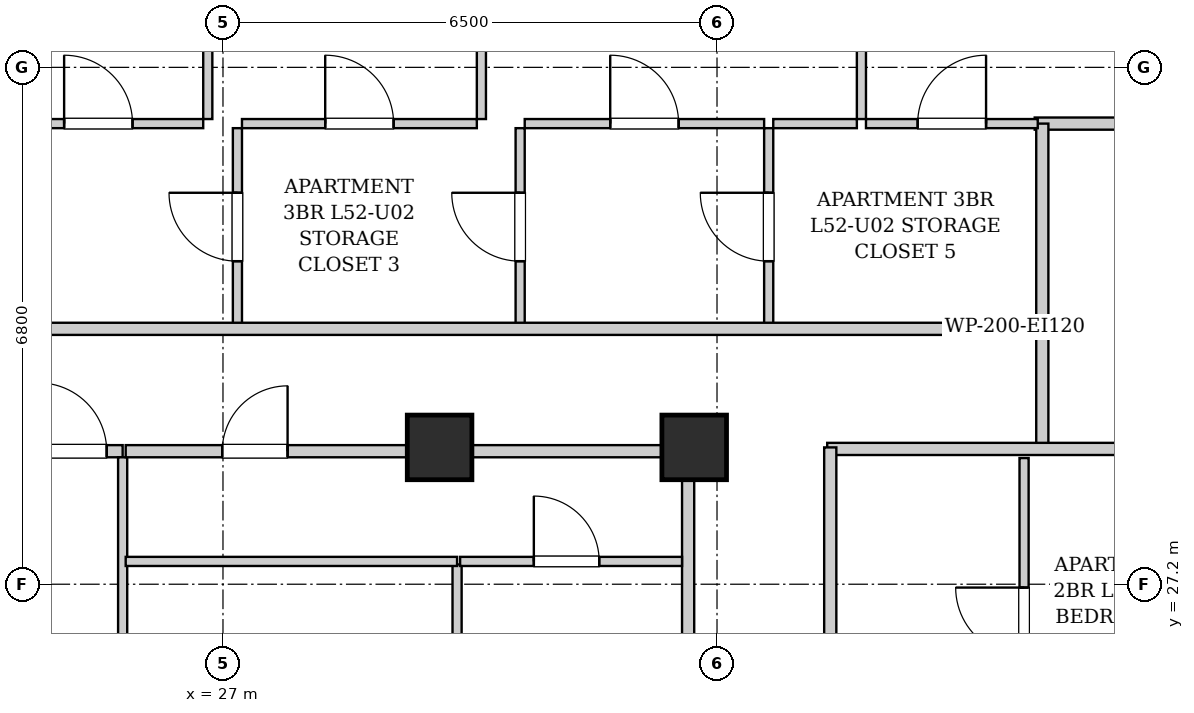
"""IFC4 building model, lengths in metres.
Left out: names, types, materials, properties, quantities, classifications, styles, units other than length and angle.
Written with IfcOpenShell. Run it as: python <this file> out.ifc"""

import sys

from ifc_helpers import new_model, si_unit, direction, frame, frame_2d, origin, origin_2d, place, context, subcontext, project, spatial, rectangle, extrude, element, fill, save


model = new_model("IFC4")
c1 = context("Model", 3, precision=1e-05, world=origin(), true_north=direction((0.0, 1.0)))
c2 = subcontext(c1, "Body", "Model", "MODEL_VIEW")
j1 = project(units=[si_unit("LENGTHUNIT", "METRE"), si_unit("PLANEANGLEUNIT", "RADIAN")], contexts=[c1])
p1 = place(None, origin())
s1 = spatial("IfcSite", under=j1, at=p1, CompositionType="ELEMENT")
p2 = place(p1, origin())
s2 = spatial("IfcBuilding", under=s1, at=p2, CompositionType="ELEMENT")
p3 = place(p2, frame((0.0, 0.0, 181.0)))
s3 = spatial("IfcBuildingStorey", under=s2, at=p3, CompositionType="ELEMENT", Elevation=181.0)
for number, where, z_axis, x_axis in (
    (1, (29.85, 29.0, 0.0), (0.0, 0.0, 1.0), (1.0, 0.0, 0.0)),
    (2, (33.2, 29.0, 0.0), (0.0, 0.0, 1.0), (1.0, 0.0, 0.0)),
):
    element("IfcColumn", number, at=place(p3, frame(where, z_axis=z_axis, x_axis=x_axis)), inside=s3, PredefinedType="COLUMN", context=c2, shape_type="SweptSolid", body=[
        extrude(rectangle(XDim=0.85, YDim=0.85, at=origin_2d()), origin(), (0.0, 0.0, 1.0), 3.3),
    ])
p4 = place(p3, frame((33.12, 24.12, 0.0), z_axis=(0.0, 0.0, 1.0), x_axis=(0.0, 1.0, 0.0)))
e3 = element("IfcWall", 3, at=p4, inside=s3, PredefinedType="PARTITIONING", context=c2, shape_type="SweptSolid", body=[
    extrude(rectangle(XDim=4.76, YDim=0.16, at=frame_2d((2.38, 0.0))), origin(), (0.0, 0.0, 1.0), 3.04),
])
p5 = place(p3, frame((24.36, 28.95, 0.0), z_axis=(0.0, 0.0, 1.0), x_axis=(1.0, 0.0, 0.0)))
e4 = element("IfcWall", 4, at=p5, inside=s3, PredefinedType="PARTITIONING", context=c2, shape_type="SweptSolid", body=[
    extrude(rectangle(XDim=1.32, YDim=0.16, at=frame_2d((0.66, 0.0))), origin(), (0.0, 0.0, 1.0), 2.556),
])
p6 = place(p5, frame((0.21, 0.0, 0.0)))
e5 = element("IfcOpeningElement", 5, at=p6, cuts=e4, PredefinedType="OPENING", context=c2, shape_type="SweptSolid", body=[
    extrude(rectangle(XDim=0.9, YDim=2.05, at=frame_2d((0.45, 1.025))), frame((0.0, 0.09, 0.0), z_axis=(0.0, -1.0, 0.0), x_axis=(1.0, 0.0, 0.0)), (0.0, 0.0, 1.0), 0.18),
])
p7 = place(p3, frame((25.68, 25.0, 0.0), z_axis=(0.0, 0.0, 1.0), x_axis=(0.0, 1.0, 0.0)))
e6 = element("IfcWall", 6, at=p7, inside=s3, PredefinedType="PARTITIONING", context=c2, shape_type="SweptSolid", body=[
    extrude(rectangle(XDim=3.87, YDim=0.12, at=frame_2d((1.935, 0.0))), origin(), (0.0, 0.0, 1.0), 3.04),
])
p8 = place(p3, frame((30.08, 26.18, 0.0), z_axis=(0.0, 0.0, 1.0), x_axis=(0.0, 1.0, 0.0)))
e7 = element("IfcWall", 7, at=p8, inside=s3, PredefinedType="PARTITIONING", context=c2, shape_type="SweptSolid", body=[
    extrude(rectangle(XDim=1.28, YDim=0.12, at=frame_2d((0.64, 0.0))), origin(), (0.0, 0.0, 1.0), 3.04),
])
p9 = place(p3, frame((30.12, 27.5, 0.0), z_axis=(0.0, 0.0, 1.0), x_axis=(1.0, 0.0, 0.0)))
e8 = element("IfcWall", 8, at=p9, inside=s3, PredefinedType="PARTITIONING", context=c2, shape_type="SweptSolid", body=[
    extrude(rectangle(XDim=2.92, YDim=0.12, at=frame_2d((1.46, 0.0))), origin(), (0.0, 0.0, 1.0), 3.04),
])
p10 = place(p9, frame((0.97, 0.0, 0.0)))
e9 = element("IfcOpeningElement", 9, at=p10, cuts=e8, PredefinedType="OPENING", context=c2, shape_type="SweptSolid", body=[
    extrude(rectangle(XDim=0.86, YDim=2.05, at=frame_2d((0.43, 1.025))), frame((0.0, 0.07, 0.0), z_axis=(0.0, -1.0, 0.0), x_axis=(1.0, 0.0, 0.0)), (0.0, 0.0, 1.0), 0.14),
])
p11 = place(p3, frame((25.72, 27.5, 0.0), z_axis=(0.0, 0.0, 1.0), x_axis=(1.0, 0.0, 0.0)))
e10 = element("IfcWall", 10, at=p11, inside=s3, PredefinedType="PARTITIONING", context=c2, shape_type="SweptSolid", body=[
    extrude(rectangle(XDim=4.36, YDim=0.12, at=frame_2d((2.18, 0.0))), origin(), (0.0, 0.0, 1.0), 3.04),
])
p12 = place(p3, frame((25.72, 28.95, 0.0), z_axis=(0.0, 0.0, 1.0), x_axis=(1.0, 0.0, 0.0)))
e11 = element("IfcWall", 11, at=p12, inside=s3, PredefinedType="PARTITIONING", context=c2, shape_type="SweptSolid", body=[
    extrude(rectangle(XDim=7.32, YDim=0.16, at=frame_2d((3.66, 0.0))), origin(), (0.0, 0.0, 1.0), 2.556),
])
p13 = place(p12, frame((1.27, 0.0, 0.0)))
e12 = element("IfcOpeningElement", 12, at=p13, cuts=e11, PredefinedType="OPENING", context=c2, shape_type="SweptSolid", body=[
    extrude(rectangle(XDim=0.86, YDim=2.05, at=frame_2d((0.43, 1.025))), frame((0.0, 0.09, 0.0), z_axis=(0.0, -1.0, 0.0), x_axis=(1.0, 0.0, 0.0)), (0.0, 0.0, 1.0), 0.18),
])
p14 = place(p3, frame((37.78, 28.98, 0.0), z_axis=(0.0, 0.0, 1.0), x_axis=(0.0, 1.0, 0.0)))
e13 = element("IfcWall", 13, at=p14, inside=s3, PredefinedType="PARTITIONING", context=c2, shape_type="SweptSolid", body=[
    extrude(rectangle(XDim=1.58, YDim=0.16, at=frame_2d((0.79, 0.0))), origin(), (0.0, 0.0, 1.0), 3.04),
])
p15 = place(p3, frame((34.95, 28.98, 0.0), z_axis=(0.0, 0.0, 1.0), x_axis=(1.0, 0.0, 0.0)))
e14 = element("IfcWall", 14, at=p15, inside=s3, PredefinedType="PARTITIONING", context=c2, shape_type="SweptSolid", body=[
    extrude(rectangle(XDim=5.07, YDim=0.16, at=frame_2d((2.535, 0.0))), origin(), (0.0, 0.0, 1.0), 2.556),
])
p16 = place(p3, frame((37.68, 33.26, 0.0), z_axis=(0.0, 0.0, 1.0), x_axis=(1.0, 0.0, 0.0)))
e15 = element("IfcWall", 15, at=p16, inside=s3, PredefinedType="PARTITIONING", context=c2, shape_type="SweptSolid", body=[
    extrude(rectangle(XDim=2.34, YDim=0.16, at=frame_2d((1.17, 0.0))), origin(), (0.0, 0.0, 1.0), 3.04),
])
p17 = place(p3, frame((37.78, 30.6, 0.0), z_axis=(0.0, 0.0, 1.0), x_axis=(0.0, 1.0, 0.0)))
e16 = element("IfcWall", 16, at=p17, inside=s3, PredefinedType="PARTITIONING", context=c2, shape_type="SweptSolid", body=[
    extrude(rectangle(XDim=2.66, YDim=0.16, at=frame_2d((1.33, 0.0))), origin(), (0.0, 0.0, 1.0), 3.04),
])
p18 = place(p3, frame((27.19, 30.6, 0.0), z_axis=(0.0, 0.0, 1.0), x_axis=(0.0, 1.0, 0.0)))
e17 = element("IfcWall", 17, at=p18, inside=s3, PredefinedType="PARTITIONING", context=c2, shape_type="SweptSolid", body=[
    extrude(rectangle(XDim=2.6, YDim=0.12, at=frame_2d((1.3, 0.0))), origin(), (0.0, 0.0, 1.0), 3.04),
])
p19 = place(p18, frame((0.85, 0.0, 0.0)))
e18 = element("IfcOpeningElement", 18, at=p19, cuts=e17, PredefinedType="OPENING", context=c2, shape_type="SweptSolid", body=[
    extrude(rectangle(XDim=0.9, YDim=2.05, at=frame_2d((0.45, 1.025))), frame((0.0, 0.07, 0.0), z_axis=(0.0, -1.0, 0.0), x_axis=(1.0, 0.0, 0.0)), (0.0, 0.0, 1.0), 0.14),
])
p20 = place(p3, frame((23.98, 33.26, 0.0), z_axis=(0.0, 0.0, 1.0), x_axis=(1.0, 0.0, 0.0)))
e19 = element("IfcWall", 19, at=p20, inside=s3, PredefinedType="PARTITIONING", context=c2, shape_type="SweptSolid", body=[
    extrude(rectangle(XDim=2.76, YDim=0.12, at=frame_2d((1.38, 0.0))), origin(), (0.0, 0.0, 1.0), 3.04),
])
p21 = place(p20, frame((0.93, 0.0, 0.0)))
e20 = element("IfcOpeningElement", 20, at=p21, cuts=e19, PredefinedType="OPENING", context=c2, shape_type="SweptSolid", body=[
    extrude(rectangle(XDim=0.9, YDim=2.05, at=frame_2d((0.45, 1.025))), frame((0.0, 0.07, 0.0), z_axis=(0.0, -1.0, 0.0), x_axis=(1.0, 0.0, 0.0)), (0.0, 0.0, 1.0), 0.14),
])
p22 = place(p3, frame((30.91, 30.6, 0.0), z_axis=(0.0, 0.0, 1.0), x_axis=(0.0, 1.0, 0.0)))
e21 = element("IfcWall", 21, at=p22, inside=s3, PredefinedType="PARTITIONING", context=c2, shape_type="SweptSolid", body=[
    extrude(rectangle(XDim=2.6, YDim=0.12, at=frame_2d((1.3, 0.0))), origin(), (0.0, 0.0, 1.0), 3.04),
])
p23 = place(p22, frame((0.85, 0.0, 0.0)))
e22 = element("IfcOpeningElement", 22, at=p23, cuts=e21, PredefinedType="OPENING", context=c2, shape_type="SweptSolid", body=[
    extrude(rectangle(XDim=0.9, YDim=2.05, at=frame_2d((0.45, 1.025))), frame((0.0, 0.07, 0.0), z_axis=(0.0, -1.0, 0.0), x_axis=(1.0, 0.0, 0.0)), (0.0, 0.0, 1.0), 0.14),
])
p24 = place(p3, frame((27.25, 33.26, 0.0), z_axis=(0.0, 0.0, 1.0), x_axis=(1.0, 0.0, 0.0)))
e23 = element("IfcWall", 23, at=p24, inside=s3, PredefinedType="PARTITIONING", context=c2, shape_type="SweptSolid", body=[
    extrude(rectangle(XDim=3.09, YDim=0.12, at=frame_2d((1.545, 0.0))), origin(), (0.0, 0.0, 1.0), 3.04),
])
p25 = place(p24, frame((1.095, 0.0, 0.0)))
e24 = element("IfcOpeningElement", 24, at=p25, cuts=e23, PredefinedType="OPENING", context=c2, shape_type="SweptSolid", body=[
    extrude(rectangle(XDim=0.9, YDim=2.05, at=frame_2d((0.45, 1.025))), frame((0.0, 0.07, 0.0), z_axis=(0.0, -1.0, 0.0), x_axis=(1.0, 0.0, 0.0)), (0.0, 0.0, 1.0), 0.14),
])
p26 = place(p3, frame((34.18, 30.6, 0.0), z_axis=(0.0, 0.0, 1.0), x_axis=(0.0, 1.0, 0.0)))
e25 = element("IfcWall", 25, at=p26, inside=s3, PredefinedType="PARTITIONING", context=c2, shape_type="SweptSolid", body=[
    extrude(rectangle(XDim=2.6, YDim=0.12, at=frame_2d((1.3, 0.0))), origin(), (0.0, 0.0, 1.0), 3.04),
])
p27 = place(p26, frame((0.85, 0.0, 0.0)))
e26 = element("IfcOpeningElement", 26, at=p27, cuts=e25, PredefinedType="OPENING", context=c2, shape_type="SweptSolid", body=[
    extrude(rectangle(XDim=0.9, YDim=2.05, at=frame_2d((0.45, 1.025))), frame((0.0, 0.07, 0.0), z_axis=(0.0, -1.0, 0.0), x_axis=(1.0, 0.0, 0.0)), (0.0, 0.0, 1.0), 0.14),
])
p28 = place(p3, frame((30.97, 33.26, 0.0), z_axis=(0.0, 0.0, 1.0), x_axis=(1.0, 0.0, 0.0)))
e27 = element("IfcWall", 27, at=p28, inside=s3, PredefinedType="PARTITIONING", context=c2, shape_type="SweptSolid", body=[
    extrude(rectangle(XDim=3.15, YDim=0.12, at=frame_2d((1.575, 0.0))), origin(), (0.0, 0.0, 1.0), 3.04),
])
p29 = place(p28, frame((1.125, 0.0, 0.0)))
e28 = element("IfcOpeningElement", 28, at=p29, cuts=e27, PredefinedType="OPENING", context=c2, shape_type="SweptSolid", body=[
    extrude(rectangle(XDim=0.9, YDim=2.05, at=frame_2d((0.45, 1.025))), frame((0.0, 0.07, 0.0), z_axis=(0.0, -1.0, 0.0), x_axis=(1.0, 0.0, 0.0)), (0.0, 0.0, 1.0), 0.14),
])
p30 = place(p3, frame((34.24, 33.26, 0.0), z_axis=(0.0, 0.0, 1.0), x_axis=(1.0, 0.0, 0.0)))
e29 = element("IfcWall", 29, at=p30, inside=s3, PredefinedType="PARTITIONING", context=c2, shape_type="SweptSolid", body=[
    extrude(rectangle(XDim=1.1, YDim=0.12, at=frame_2d((0.55, 0.0))), origin(), (0.0, 0.0, 1.0), 3.04),
])
p31 = place(p3, frame((35.46, 33.26, 0.0), z_axis=(0.0, 0.0, 1.0), x_axis=(1.0, 0.0, 0.0)))
e30 = element("IfcWall", 30, at=p31, inside=s3, PredefinedType="PARTITIONING", context=c2, shape_type="SweptSolid", body=[
    extrude(rectangle(XDim=2.26, YDim=0.12, at=frame_2d((1.13, 0.0))), origin(), (0.0, 0.0, 1.0), 3.04),
])
p32 = place(p31, frame((0.68, 0.0, 0.0)))
e31 = element("IfcOpeningElement", 31, at=p32, cuts=e30, PredefinedType="OPENING", context=c2, shape_type="SweptSolid", body=[
    extrude(rectangle(XDim=0.9, YDim=2.05, at=frame_2d((0.45, 1.025))), frame((0.0, 0.07, 0.0), z_axis=(0.0, -1.0, 0.0), x_axis=(1.0, 0.0, 0.0)), (0.0, 0.0, 1.0), 0.14),
])
p33 = place(p3, frame((26.8, 33.32, 0.0), z_axis=(0.0, 0.0, 1.0), x_axis=(0.0, 1.0, 0.0)))
e32 = element("IfcWall", 32, at=p33, inside=s3, PredefinedType="PARTITIONING", context=c2, shape_type="SweptSolid", body=[
    extrude(rectangle(XDim=6.6, YDim=0.12, at=frame_2d((3.3, 0.0))), origin(), (0.0, 0.0, 1.0), 3.04),
])
p34 = place(p33, frame((2.835, 0.0, 0.0)))
e33 = element("IfcOpeningElement", 33, at=p34, cuts=e32, PredefinedType="OPENING", context=c2, shape_type="SweptSolid", body=[
    extrude(rectangle(XDim=0.9, YDim=2.05, at=frame_2d((0.45, 1.025))), frame((0.0, 0.07, 0.0), z_axis=(0.0, -1.0, 0.0), x_axis=(1.0, 0.0, 0.0)), (0.0, 0.0, 1.0), 0.14),
])
p35 = place(p3, frame((30.4, 33.32, 0.0), z_axis=(0.0, 0.0, 1.0), x_axis=(0.0, 1.0, 0.0)))
e34 = element("IfcWall", 34, at=p35, inside=s3, PredefinedType="PARTITIONING", context=c2, shape_type="SweptSolid", body=[
    extrude(rectangle(XDim=4.45, YDim=0.12, at=frame_2d((2.225, 0.0))), origin(), (0.0, 0.0, 1.0), 3.04),
])
p36 = place(p35, frame((1.775, 0.0, 0.0)))
e35 = element("IfcOpeningElement", 35, at=p36, cuts=e34, PredefinedType="OPENING", context=c2, shape_type="SweptSolid", body=[
    extrude(rectangle(XDim=0.9, YDim=2.05, at=frame_2d((0.45, 1.025))), frame((0.0, 0.07, 0.0), z_axis=(0.0, -1.0, 0.0), x_axis=(1.0, 0.0, 0.0)), (0.0, 0.0, 1.0), 0.14),
])
p37 = place(p3, frame((35.4, 33.32, 0.0), z_axis=(0.0, 0.0, 1.0), x_axis=(0.0, 1.0, 0.0)))
e36 = element("IfcWall", 36, at=p37, inside=s3, PredefinedType="PARTITIONING", context=c2, shape_type="SweptSolid", body=[
    extrude(rectangle(XDim=4.45, YDim=0.12, at=frame_2d((2.225, 0.0))), origin(), (0.0, 0.0, 1.0), 3.04),
])
p38 = place(p37, frame((1.775, 0.0, 0.0)))
e37 = element("IfcOpeningElement", 37, at=p38, cuts=e36, PredefinedType="OPENING", context=c2, shape_type="SweptSolid", body=[
    extrude(rectangle(XDim=0.9, YDim=2.05, at=frame_2d((0.45, 1.025))), frame((0.0, 0.07, 0.0), z_axis=(0.0, -1.0, 0.0), x_axis=(1.0, 0.0, 0.0)), (0.0, 0.0, 1.0), 0.14),
])
p39 = place(p3, frame((37.54, 24.552, 0.0), z_axis=(0.0, 0.0, 1.0), x_axis=(0.0, 1.0, 0.0)))
e38 = element("IfcWall", 38, at=p39, inside=s3, PredefinedType="PARTITIONING", context=c2, shape_type="SweptSolid", body=[
    extrude(rectangle(XDim=4.308, YDim=0.12, at=frame_2d((2.154, 0.0))), origin(), (0.0, 0.0, 1.0), 3.04),
])
p40 = place(p39, frame((1.704, 0.0, 0.0)))
e39 = element("IfcOpeningElement", 39, at=p40, cuts=e38, PredefinedType="OPENING", context=c2, shape_type="SweptSolid", body=[
    extrude(rectangle(XDim=0.9, YDim=2.05, at=frame_2d((0.45, 1.025))), frame((0.0, 0.07, 0.0), z_axis=(0.0, -1.0, 0.0), x_axis=(1.0, 0.0, 0.0)), (0.0, 0.0, 1.0), 0.14),
])
p41 = place(p3, frame((13.15, 30.56, 0.0), z_axis=(0.0, 0.0, 1.0), x_axis=(1.0, 0.0, 0.0)))
e40 = element("IfcWall", 40, at=p41, inside=s3, PredefinedType="PARTITIONING", context=c2, shape_type="SweptSolid", body=[
    extrude(rectangle(XDim=24.6, YDim=0.16, at=frame_2d((12.3, 0.0))), origin(), (0.0, 0.0, 1.0), 3.04),
])
p42 = place(p41, frame((5.235, 0.0, 0.0)))
e41 = element("IfcOpeningElement", 41, at=p42, cuts=e40, PredefinedType="OPENING", context=c2, shape_type="SweptSolid", body=[
    extrude(rectangle(XDim=0.95, YDim=2.1, at=frame_2d((0.475, 1.05))), frame((0.0, 0.09, 0.0), z_axis=(0.0, -1.0, 0.0), x_axis=(1.0, 0.0, 0.0)), (0.0, 0.0, 1.0), 0.18),
])
p43 = place(p3, frame((34.99, 15.07, 0.0), z_axis=(0.0, 0.0, 1.0), x_axis=(0.0, 1.0, 0.0)))
e42 = element("IfcWall", 42, at=p43, inside=s3, PredefinedType="PARTITIONING", context=c2, shape_type="SweptSolid", body=[
    extrude(rectangle(XDim=13.93, YDim=0.16, at=frame_2d((6.965, 0.0))), origin(), (0.0, 0.0, 1.0), 3.04),
])
p44 = place(p43, frame((4.385, 0.0, 0.0)))
e43 = element("IfcOpeningElement", 43, at=p44, cuts=e42, PredefinedType="OPENING", context=c2, shape_type="SweptSolid", body=[
    extrude(rectangle(XDim=0.95, YDim=2.1, at=frame_2d((0.475, 1.05))), frame((0.0, 0.09, 0.0), z_axis=(0.0, -1.0, 0.0), x_axis=(1.0, 0.0, 0.0)), (0.0, 0.0, 1.0), 0.18),
])
p45 = place(p6, origin())
e44 = element("IfcDoor", 44, at=p45, inside=s3, OperationType="SINGLE_SWING_LEFT", PredefinedType="DOOR", context=c2, shape_type="SweptSolid", body=[
    extrude(rectangle(XDim=0.9, YDim=2.05, at=frame_2d((0.45, 1.025))), frame((0.0, 0.025, 0.0), z_axis=(0.0, -1.0, 0.0), x_axis=(1.0, 0.0, 0.0)), (0.0, 0.0, 1.0), 0.05),
])
fill(e5, e44)
p46 = place(p10, origin())
e45 = element("IfcDoor", 45, at=p46, inside=s3, OperationType="SINGLE_SWING_LEFT", PredefinedType="DOOR", context=c2, shape_type="SweptSolid", body=[
    extrude(rectangle(XDim=0.86, YDim=2.05, at=frame_2d((0.43, 1.025))), frame((0.0, 0.025, 0.0), z_axis=(0.0, -1.0, 0.0), x_axis=(1.0, 0.0, 0.0)), (0.0, 0.0, 1.0), 0.05),
])
fill(e9, e45)
p47 = place(p13, origin())
e46 = element("IfcDoor", 46, at=p47, inside=s3, OperationType="SINGLE_SWING_RIGHT", PredefinedType="DOOR", context=c2, shape_type="SweptSolid", body=[
    extrude(rectangle(XDim=0.86, YDim=2.05, at=frame_2d((0.43, 1.025))), frame((0.0, 0.025, 0.0), z_axis=(0.0, -1.0, 0.0), x_axis=(1.0, 0.0, 0.0)), (0.0, 0.0, 1.0), 0.05),
])
fill(e12, e46)
p48 = place(p19, origin())
e47 = element("IfcDoor", 47, at=p48, inside=s3, OperationType="SINGLE_SWING_RIGHT", PredefinedType="DOOR", context=c2, shape_type="SweptSolid", body=[
    extrude(rectangle(XDim=0.9, YDim=2.05, at=frame_2d((0.45, 1.025))), frame((0.0, 0.025, 0.0), z_axis=(0.0, -1.0, 0.0), x_axis=(1.0, 0.0, 0.0)), (0.0, 0.0, 1.0), 0.05),
])
fill(e18, e47)
p49 = place(p21, origin())
e48 = element("IfcDoor", 48, at=p49, inside=s3, OperationType="SINGLE_SWING_LEFT", PredefinedType="DOOR", context=c2, shape_type="SweptSolid", body=[
    extrude(rectangle(XDim=0.9, YDim=2.05, at=frame_2d((0.45, 1.025))), frame((0.0, 0.025, 0.0), z_axis=(0.0, -1.0, 0.0), x_axis=(1.0, 0.0, 0.0)), (0.0, 0.0, 1.0), 0.05),
])
fill(e20, e48)
p50 = place(p23, origin())
e49 = element("IfcDoor", 49, at=p50, inside=s3, OperationType="SINGLE_SWING_RIGHT", PredefinedType="DOOR", context=c2, shape_type="SweptSolid", body=[
    extrude(rectangle(XDim=0.9, YDim=2.05, at=frame_2d((0.45, 1.025))), frame((0.0, 0.025, 0.0), z_axis=(0.0, -1.0, 0.0), x_axis=(1.0, 0.0, 0.0)), (0.0, 0.0, 1.0), 0.05),
])
fill(e22, e49)
p51 = place(p25, origin())
e50 = element("IfcDoor", 50, at=p51, inside=s3, OperationType="SINGLE_SWING_LEFT", PredefinedType="DOOR", context=c2, shape_type="SweptSolid", body=[
    extrude(rectangle(XDim=0.9, YDim=2.05, at=frame_2d((0.45, 1.025))), frame((0.0, 0.025, 0.0), z_axis=(0.0, -1.0, 0.0), x_axis=(1.0, 0.0, 0.0)), (0.0, 0.0, 1.0), 0.05),
])
fill(e24, e50)
p52 = place(p27, origin())
e51 = element("IfcDoor", 51, at=p52, inside=s3, OperationType="SINGLE_SWING_RIGHT", PredefinedType="DOOR", context=c2, shape_type="SweptSolid", body=[
    extrude(rectangle(XDim=0.9, YDim=2.05, at=frame_2d((0.45, 1.025))), frame((0.0, 0.025, 0.0), z_axis=(0.0, -1.0, 0.0), x_axis=(1.0, 0.0, 0.0)), (0.0, 0.0, 1.0), 0.05),
])
fill(e26, e51)
p53 = place(p29, origin())
e52 = element("IfcDoor", 52, at=p53, inside=s3, OperationType="SINGLE_SWING_LEFT", PredefinedType="DOOR", context=c2, shape_type="SweptSolid", body=[
    extrude(rectangle(XDim=0.9, YDim=2.05, at=frame_2d((0.45, 1.025))), frame((0.0, 0.025, 0.0), z_axis=(0.0, -1.0, 0.0), x_axis=(1.0, 0.0, 0.0)), (0.0, 0.0, 1.0), 0.05),
])
fill(e28, e52)
p54 = place(p32, origin())
e53 = element("IfcDoor", 53, at=p54, inside=s3, OperationType="SINGLE_SWING_RIGHT", PredefinedType="DOOR", context=c2, shape_type="SweptSolid", body=[
    extrude(rectangle(XDim=0.9, YDim=2.05, at=frame_2d((0.45, 1.025))), frame((0.0, 0.025, 0.0), z_axis=(0.0, -1.0, 0.0), x_axis=(1.0, 0.0, 0.0)), (0.0, 0.0, 1.0), 0.05),
])
fill(e31, e53)
p55 = place(p40, origin())
e54 = element("IfcDoor", 54, at=p55, inside=s3, OperationType="SINGLE_SWING_RIGHT", PredefinedType="DOOR", context=c2, shape_type="SweptSolid", body=[
    extrude(rectangle(XDim=0.9, YDim=2.05, at=frame_2d((0.45, 1.025))), frame((0.0, 0.025, 0.0), z_axis=(0.0, -1.0, 0.0), x_axis=(1.0, 0.0, 0.0)), (0.0, 0.0, 1.0), 0.05),
])
fill(e39, e54)
save(model, sys.argv[1])
